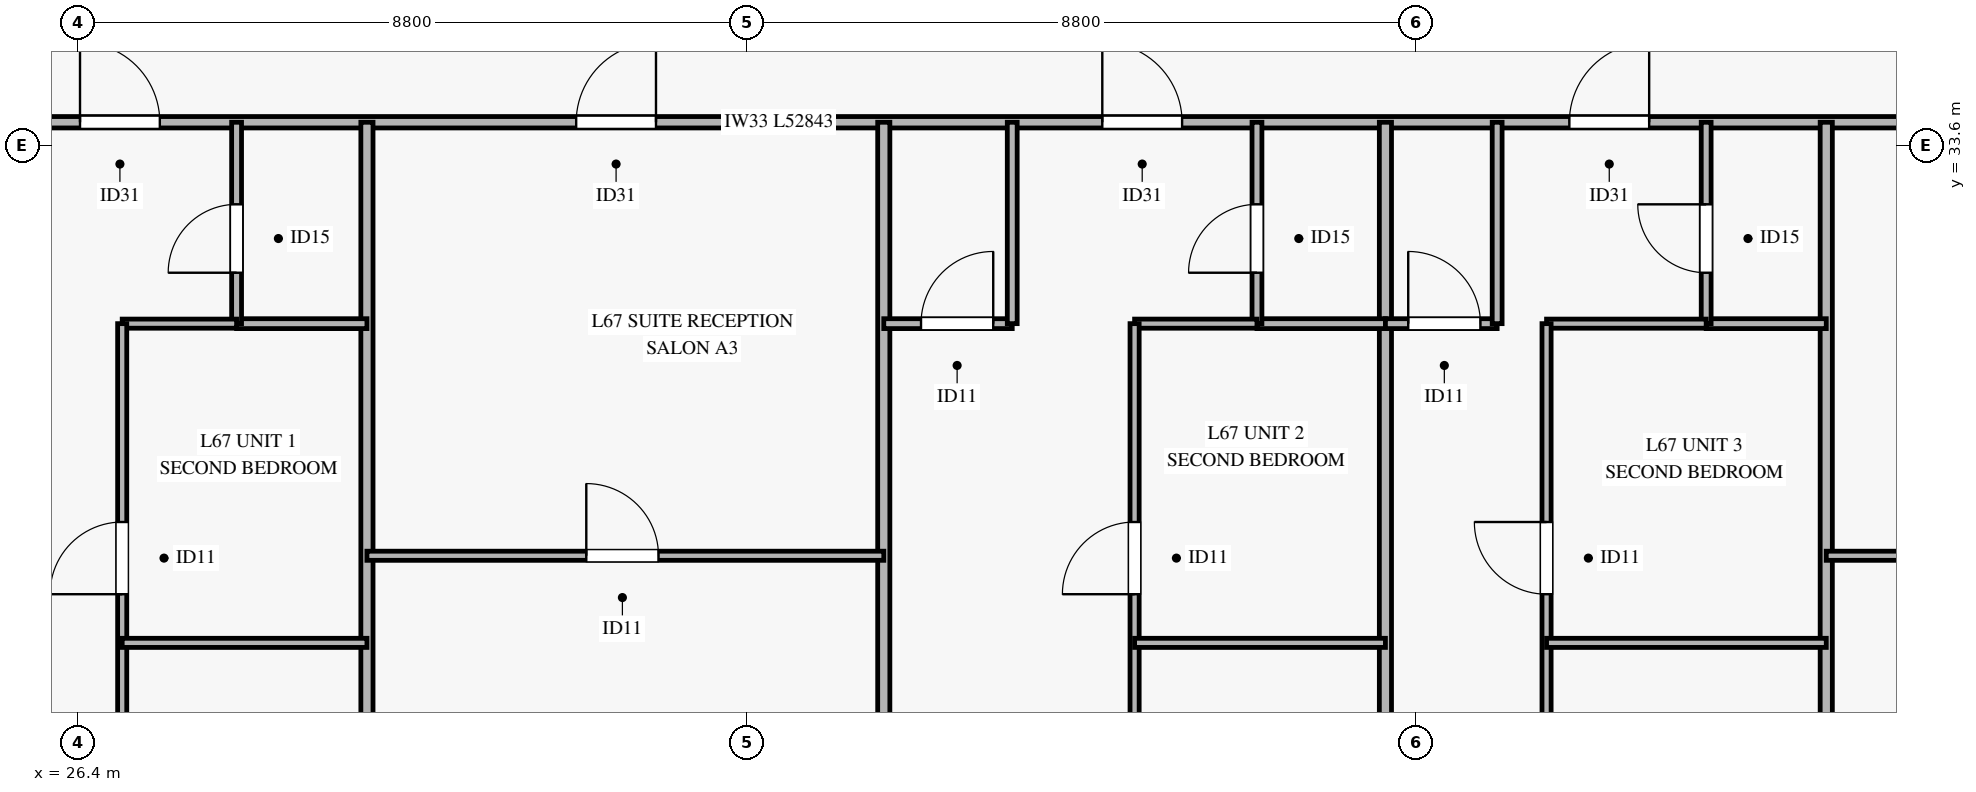
"""IFC4 building model, lengths in metres.
Left out: names, types, materials, properties, quantities, classifications, styles, units other than length and angle.
Written with IfcOpenShell. Run it as: python <this file> out.ifc"""

import sys

from ifc_helpers import new_model, si_unit, direction, frame, frame_2d, origin, place, context, subcontext, project, spatial, rectangle, extrude, source, transform, mapped, element, fill, save


model = new_model("IFC4")
c1 = context("Model", 3, precision=1e-05, world=origin(), true_north=direction((0.0, 1.0)))
c2 = subcontext(c1, "Body", "Model", "MODEL_VIEW")
j1 = project(units=[si_unit("LENGTHUNIT", "METRE"), si_unit("PLANEANGLEUNIT", "RADIAN")], contexts=[c1])
p1 = place(None, origin())
s1 = spatial("IfcSite", under=j1, at=p1, CompositionType="ELEMENT")
p2 = place(p1, origin())
s2 = spatial("IfcBuilding", under=s1, at=p2, CompositionType="ELEMENT")
p3 = place(p2, frame((0.0, 0.0, 262.1)))
s3 = spatial("IfcBuildingStorey", under=s2, at=p3, CompositionType="ELEMENT", Elevation=262.1)
p4 = place(p3, frame((8.779, 33.9, 0.0), z_axis=(0.0, 0.0, 1.0), x_axis=(1.0, 0.0, 0.0)))
e1 = element("IfcWall", 1, at=p4, inside=s3, PredefinedType="PARTITIONING", context=c2, shape_type="SweptSolid", body=[
    extrude(rectangle(XDim=52.843, YDim=0.15, at=frame_2d((26.421, 0.0))), origin(), (0.0, 0.0, 1.0), 2.47),
])
p5 = place(p4, frame((5.887, 0.0, 0.0)))
e2 = element("IfcOpeningElement", 2, at=p5, cuts=e1, PredefinedType="OPENING", context=c2, shape_type="SweptSolid", body=[
    extrude(rectangle(XDim=1.05, YDim=2.15, at=frame_2d((0.525, 1.075))), frame((0.0, 0.085, 0.0), z_axis=(0.0, -1.0, 0.0), x_axis=(1.0, 0.0, 0.0)), (0.0, 0.0, 1.0), 0.17),
])
p6 = place(p4, frame((17.646, 0.0, 0.0)))
e3 = element("IfcOpeningElement", 3, at=p6, cuts=e1, PredefinedType="OPENING", context=c2, shape_type="SweptSolid", body=[
    extrude(rectangle(XDim=1.05, YDim=2.15, at=frame_2d((0.525, 1.075))), frame((0.0, 0.085, 0.0), z_axis=(0.0, -1.0, 0.0), x_axis=(1.0, 0.0, 0.0)), (0.0, 0.0, 1.0), 0.17),
])
p7 = place(p4, frame((24.174, 0.0, 0.0)))
e4 = element("IfcOpeningElement", 4, at=p7, cuts=e1, PredefinedType="OPENING", context=c2, shape_type="SweptSolid", body=[
    extrude(rectangle(XDim=1.05, YDim=2.15, at=frame_2d((0.525, 1.075))), frame((0.0, 0.085, 0.0), z_axis=(0.0, -1.0, 0.0), x_axis=(1.0, 0.0, 0.0)), (0.0, 0.0, 1.0), 0.17),
])
p8 = place(p4, frame((31.096, 0.0, 0.0)))
e5 = element("IfcOpeningElement", 5, at=p8, cuts=e1, PredefinedType="OPENING", context=c2, shape_type="SweptSolid", body=[
    extrude(rectangle(XDim=1.05, YDim=2.15, at=frame_2d((0.525, 1.075))), frame((0.0, 0.085, 0.0), z_axis=(0.0, -1.0, 0.0), x_axis=(1.0, 0.0, 0.0)), (0.0, 0.0, 1.0), 0.17),
])
p9 = place(p4, frame((37.241, 0.0, 0.0)))
e6 = element("IfcOpeningElement", 6, at=p9, cuts=e1, PredefinedType="OPENING", context=c2, shape_type="SweptSolid", body=[
    extrude(rectangle(XDim=1.05, YDim=2.15, at=frame_2d((0.525, 1.075))), frame((0.0, 0.085, 0.0), z_axis=(0.0, -1.0, 0.0), x_axis=(1.0, 0.0, 0.0)), (0.0, 0.0, 1.0), 0.17),
])
p10 = place(p4, frame((45.359, 0.0, 0.0)))
e7 = element("IfcOpeningElement", 7, at=p10, cuts=e1, PredefinedType="OPENING", context=c2, shape_type="SweptSolid", body=[
    extrude(rectangle(XDim=1.05, YDim=2.15, at=frame_2d((0.525, 1.075))), frame((0.0, 0.085, 0.0), z_axis=(0.0, -1.0, 0.0), x_axis=(1.0, 0.0, 0.0)), (0.0, 0.0, 1.0), 0.17),
])
for number, where, z_axis, x_axis in (
    (8, (30.2, 16.045, 0.0), (0.0, 0.0, 1.0), (0.0, 1.0, 0.0)),
    (9, (37.0, 16.045, 0.0), (0.0, 0.0, 1.0), (0.0, 1.0, 0.0)),
    (10, (43.6, 16.045, 0.0), (0.0, 0.0, 1.0), (0.0, 1.0, 0.0)),
    (11, (49.4, 16.045, 0.0), (0.0, 0.0, 1.0), (0.0, 1.0, 0.0)),
):
    element("IfcWall", number, at=place(p3, frame(where, z_axis=z_axis, x_axis=x_axis)), inside=s3, PredefinedType="PARTITIONING", context=c2, shape_type="SweptSolid", body=[
        extrude(rectangle(XDim=17.855, YDim=0.16, at=frame_2d((8.927, 0.0))), origin(), (0.0, 0.0, 1.0), 2.77),
    ])
p11 = place(p3, frame((28.485, 31.25, 0.0), z_axis=(0.0, 0.0, 1.0), x_axis=(1.0, 0.0, 0.0)))
e12 = element("IfcWall", 12, at=p11, inside=s3, PredefinedType="PARTITIONING", context=c2, shape_type="SweptSolid", body=[
    extrude(rectangle(XDim=1.715, YDim=0.13, at=frame_2d((0.857, 0.0))), origin(), (0.0, 0.0, 1.0), 3.185),
])
p12 = place(p3, frame((28.485, 31.25, 0.0), z_axis=(0.0, 0.0, 1.0), x_axis=(0.0, 1.0, 0.0)))
e13 = element("IfcWall", 13, at=p12, inside=s3, PredefinedType="PARTITIONING", context=c2, shape_type="SweptSolid", body=[
    extrude(rectangle(XDim=2.65, YDim=0.13, at=frame_2d((1.325, 0.0))), origin(), (0.0, 0.0, 1.0), 2.77),
])
p13 = place(p12, frame((0.67, 0.0, 0.0)))
e14 = element("IfcOpeningElement", 14, at=p13, cuts=e13, PredefinedType="OPENING", context=c2, shape_type="SweptSolid", body=[
    extrude(rectangle(XDim=0.9, YDim=2.1, at=frame_2d((0.45, 1.05))), frame((0.0, 0.075, 0.0), z_axis=(0.0, -1.0, 0.0), x_axis=(1.0, 0.0, 0.0)), (0.0, 0.0, 1.0), 0.15),
])
p14 = place(p3, frame((26.98, 31.25, 0.0), z_axis=(0.0, 0.0, 1.0), x_axis=(1.0, 0.0, 0.0)))
e15 = element("IfcWall", 15, at=p14, inside=s3, PredefinedType="PARTITIONING", context=c2, shape_type="SweptSolid", body=[
    extrude(rectangle(XDim=1.505, YDim=0.12, at=frame_2d((0.752, 0.0))), origin(), (0.0, 0.0, 1.0), 3.185),
])
p15 = place(p3, frame((26.98, 16.045, 0.0), z_axis=(0.0, 0.0, 1.0), x_axis=(0.0, 1.0, 0.0)))
e16 = element("IfcWall", 16, at=p15, inside=s3, PredefinedType="PARTITIONING", context=c2, shape_type="SweptSolid", body=[
    extrude(rectangle(XDim=15.205, YDim=0.12, at=frame_2d((7.603, 0.0))), origin(), (0.0, 0.0, 1.0), 2.77),
])
p16 = place(p15, frame((0.67, 0.0, 0.0)))
e17 = element("IfcOpeningElement", 17, at=p16, cuts=e16, PredefinedType="OPENING", context=c2, shape_type="SweptSolid", body=[
    extrude(rectangle(XDim=0.95, YDim=2.1, at=frame_2d((0.475, 1.05))), frame((0.0, 0.07, 0.0), z_axis=(0.0, -1.0, 0.0), x_axis=(1.0, 0.0, 0.0)), (0.0, 0.0, 1.0), 0.14),
])
p17 = place(p15, frame((11.645, 0.0, 0.0)))
e18 = element("IfcOpeningElement", 18, at=p17, cuts=e16, PredefinedType="OPENING", context=c2, shape_type="SweptSolid", body=[
    extrude(rectangle(XDim=0.95, YDim=2.1, at=frame_2d((0.475, 1.05))), frame((0.0, 0.07, 0.0), z_axis=(0.0, -1.0, 0.0), x_axis=(1.0, 0.0, 0.0)), (0.0, 0.0, 1.0), 0.14),
])
p18 = place(p3, frame((26.98, 27.05, 0.0), z_axis=(0.0, 0.0, 1.0), x_axis=(1.0, 0.0, 0.0)))
e19 = element("IfcWall", 19, at=p18, inside=s3, PredefinedType="PARTITIONING", context=c2, shape_type="SweptSolid", body=[
    extrude(rectangle(XDim=3.22, YDim=0.12, at=frame_2d((1.61, 0.0))), origin(), (0.0, 0.0, 1.0), 3.185),
])
p19 = place(p3, frame((30.2, 28.196, 0.0), z_axis=(0.0, 0.0, 1.0), x_axis=(1.0, 0.0, 0.0)))
e20 = element("IfcWall", 20, at=p19, inside=s3, PredefinedType="PARTITIONING", context=c2, shape_type="SweptSolid", body=[
    extrude(rectangle(XDim=6.8, YDim=0.12, at=frame_2d((3.4, 0.0))), origin(), (0.0, 0.0, 1.0), 2.47),
])
p20 = place(p19, frame((2.886, 0.0, 0.0)))
e21 = element("IfcOpeningElement", 21, at=p20, cuts=e20, PredefinedType="OPENING", context=c2, shape_type="SweptSolid", body=[
    extrude(rectangle(XDim=0.95, YDim=2.1, at=frame_2d((0.475, 1.05))), frame((0.0, 0.07, 0.0), z_axis=(0.0, -1.0, 0.0), x_axis=(1.0, 0.0, 0.0)), (0.0, 0.0, 1.0), 0.14),
])
p21 = place(p3, frame((37.0, 31.25, 0.0), z_axis=(0.0, 0.0, 1.0), x_axis=(1.0, 0.0, 0.0)))
e22 = element("IfcWall", 22, at=p21, inside=s3, PredefinedType="PARTITIONING", context=c2, shape_type="SweptSolid", body=[
    extrude(rectangle(XDim=1.69, YDim=0.13, at=frame_2d((0.845, 0.0))), origin(), (0.0, 0.0, 1.0), 2.47),
])
p22 = place(p21, frame((0.49, 0.0, 0.0)))
e23 = element("IfcOpeningElement", 23, at=p22, cuts=e22, PredefinedType="OPENING", context=c2, shape_type="SweptSolid", body=[
    extrude(rectangle(XDim=0.95, YDim=2.1, at=frame_2d((0.475, 1.05))), frame((0.0, 0.075, 0.0), z_axis=(0.0, -1.0, 0.0), x_axis=(1.0, 0.0, 0.0)), (0.0, 0.0, 1.0), 0.15),
])
p23 = place(p3, frame((38.69, 31.25, 0.0), z_axis=(0.0, 0.0, 1.0), x_axis=(0.0, 1.0, 0.0)))
e24 = element("IfcWall", 24, at=p23, inside=s3, PredefinedType="PARTITIONING", context=c2, shape_type="SweptSolid", body=[
    extrude(rectangle(XDim=2.65, YDim=0.13, at=frame_2d((1.325, 0.0))), origin(), (0.0, 0.0, 1.0), 2.77),
])
p24 = place(p3, frame((41.91, 31.25, 0.0), z_axis=(0.0, 0.0, 1.0), x_axis=(1.0, 0.0, 0.0)))
e25 = element("IfcWall", 25, at=p24, inside=s3, PredefinedType="PARTITIONING", context=c2, shape_type="SweptSolid", body=[
    extrude(rectangle(XDim=1.69, YDim=0.13, at=frame_2d((0.845, 0.0))), origin(), (0.0, 0.0, 1.0), 3.185),
])
p25 = place(p3, frame((41.91, 31.25, 0.0), z_axis=(0.0, 0.0, 1.0), x_axis=(0.0, 1.0, 0.0)))
e26 = element("IfcWall", 26, at=p25, inside=s3, PredefinedType="PARTITIONING", context=c2, shape_type="SweptSolid", body=[
    extrude(rectangle(XDim=2.65, YDim=0.13, at=frame_2d((1.325, 0.0))), origin(), (0.0, 0.0, 1.0), 2.77),
])
p26 = place(p25, frame((0.67, 0.0, 0.0)))
e27 = element("IfcOpeningElement", 27, at=p26, cuts=e26, PredefinedType="OPENING", context=c2, shape_type="SweptSolid", body=[
    extrude(rectangle(XDim=0.9, YDim=2.1, at=frame_2d((0.45, 1.05))), frame((0.0, 0.075, 0.0), z_axis=(0.0, -1.0, 0.0), x_axis=(1.0, 0.0, 0.0)), (0.0, 0.0, 1.0), 0.15),
])
p27 = place(p3, frame((40.3, 31.25, 0.0), z_axis=(0.0, 0.0, 1.0), x_axis=(1.0, 0.0, 0.0)))
e28 = element("IfcWall", 28, at=p27, inside=s3, PredefinedType="PARTITIONING", context=c2, shape_type="SweptSolid", body=[
    extrude(rectangle(XDim=1.61, YDim=0.12, at=frame_2d((0.805, 0.0))), origin(), (0.0, 0.0, 1.0), 3.185),
])
p28 = place(p3, frame((40.3, 16.045, 0.0), z_axis=(0.0, 0.0, 1.0), x_axis=(0.0, 1.0, 0.0)))
e29 = element("IfcWall", 29, at=p28, inside=s3, PredefinedType="PARTITIONING", context=c2, shape_type="SweptSolid", body=[
    extrude(rectangle(XDim=15.205, YDim=0.12, at=frame_2d((7.603, 0.0))), origin(), (0.0, 0.0, 1.0), 2.77),
])
p29 = place(p28, frame((1.59, 0.0, 0.0)))
e30 = element("IfcOpeningElement", 30, at=p29, cuts=e29, PredefinedType="OPENING", context=c2, shape_type="SweptSolid", body=[
    extrude(rectangle(XDim=0.95, YDim=2.1, at=frame_2d((0.475, 1.05))), frame((0.0, 0.07, 0.0), z_axis=(0.0, -1.0, 0.0), x_axis=(1.0, 0.0, 0.0)), (0.0, 0.0, 1.0), 0.14),
])
p30 = place(p28, frame((11.645, 0.0, 0.0)))
e31 = element("IfcOpeningElement", 31, at=p30, cuts=e29, PredefinedType="OPENING", context=c2, shape_type="SweptSolid", body=[
    extrude(rectangle(XDim=0.95, YDim=2.1, at=frame_2d((0.475, 1.05))), frame((0.0, 0.07, 0.0), z_axis=(0.0, -1.0, 0.0), x_axis=(1.0, 0.0, 0.0)), (0.0, 0.0, 1.0), 0.14),
])
p31 = place(p3, frame((40.3, 27.05, 0.0), z_axis=(0.0, 0.0, 1.0), x_axis=(1.0, 0.0, 0.0)))
e32 = element("IfcWall", 32, at=p31, inside=s3, PredefinedType="PARTITIONING", context=c2, shape_type="SweptSolid", body=[
    extrude(rectangle(XDim=3.3, YDim=0.12, at=frame_2d((1.65, 0.0))), origin(), (0.0, 0.0, 1.0), 3.185),
])
p32 = place(p3, frame((43.6, 31.25, 0.0), z_axis=(0.0, 0.0, 1.0), x_axis=(1.0, 0.0, 0.0)))
e33 = element("IfcWall", 33, at=p32, inside=s3, PredefinedType="PARTITIONING", context=c2, shape_type="SweptSolid", body=[
    extrude(rectangle(XDim=1.47, YDim=0.13, at=frame_2d((0.735, 0.0))), origin(), (0.0, 0.0, 1.0), 2.47),
])
p33 = place(p32, frame((0.3, 0.0, 0.0)))
e34 = element("IfcOpeningElement", 34, at=p33, cuts=e33, PredefinedType="OPENING", context=c2, shape_type="SweptSolid", body=[
    extrude(rectangle(XDim=0.95, YDim=2.1, at=frame_2d((0.475, 1.05))), frame((0.0, 0.075, 0.0), z_axis=(0.0, -1.0, 0.0), x_axis=(1.0, 0.0, 0.0)), (0.0, 0.0, 1.0), 0.15),
])
p34 = place(p3, frame((45.07, 31.25, 0.0), z_axis=(0.0, 0.0, 1.0), x_axis=(0.0, 1.0, 0.0)))
e35 = element("IfcWall", 35, at=p34, inside=s3, PredefinedType="PARTITIONING", context=c2, shape_type="SweptSolid", body=[
    extrude(rectangle(XDim=2.65, YDim=0.13, at=frame_2d((1.325, 0.0))), origin(), (0.0, 0.0, 1.0), 2.77),
])
p35 = place(p3, frame((47.82, 31.25, 0.0), z_axis=(0.0, 0.0, 1.0), x_axis=(1.0, 0.0, 0.0)))
e36 = element("IfcWall", 36, at=p35, inside=s3, PredefinedType="PARTITIONING", context=c2, shape_type="SweptSolid", body=[
    extrude(rectangle(XDim=1.58, YDim=0.13, at=frame_2d((0.79, 0.0))), origin(), (0.0, 0.0, 1.0), 3.185),
])
p36 = place(p3, frame((47.82, 31.25, 0.0), z_axis=(0.0, 0.0, 1.0), x_axis=(0.0, 1.0, 0.0)))
e37 = element("IfcWall", 37, at=p36, inside=s3, PredefinedType="PARTITIONING", context=c2, shape_type="SweptSolid", body=[
    extrude(rectangle(XDim=2.65, YDim=0.13, at=frame_2d((1.325, 0.0))), origin(), (0.0, 0.0, 1.0), 2.77),
])
p37 = place(p36, frame((0.67, 0.0, 0.0)))
e38 = element("IfcOpeningElement", 38, at=p37, cuts=e37, PredefinedType="OPENING", context=c2, shape_type="SweptSolid", body=[
    extrude(rectangle(XDim=0.9, YDim=2.1, at=frame_2d((0.45, 1.05))), frame((0.0, 0.075, 0.0), z_axis=(0.0, -1.0, 0.0), x_axis=(1.0, 0.0, 0.0)), (0.0, 0.0, 1.0), 0.15),
])
p38 = place(p3, frame((45.72, 31.25, 0.0), z_axis=(0.0, 0.0, 1.0), x_axis=(1.0, 0.0, 0.0)))
e39 = element("IfcWall", 39, at=p38, inside=s3, PredefinedType="PARTITIONING", context=c2, shape_type="SweptSolid", body=[
    extrude(rectangle(XDim=2.1, YDim=0.12, at=frame_2d((1.05, 0.0))), origin(), (0.0, 0.0, 1.0), 3.185),
])
p39 = place(p3, frame((45.72, 16.045, 0.0), z_axis=(0.0, 0.0, 1.0), x_axis=(0.0, 1.0, 0.0)))
e40 = element("IfcWall", 40, at=p39, inside=s3, PredefinedType="PARTITIONING", context=c2, shape_type="SweptSolid", body=[
    extrude(rectangle(XDim=15.205, YDim=0.12, at=frame_2d((7.603, 0.0))), origin(), (0.0, 0.0, 1.0), 2.77),
])
p40 = place(p39, frame((0.67, 0.0, 0.0)))
e41 = element("IfcOpeningElement", 41, at=p40, cuts=e40, PredefinedType="OPENING", context=c2, shape_type="SweptSolid", body=[
    extrude(rectangle(XDim=0.95, YDim=2.1, at=frame_2d((0.475, 1.05))), frame((0.0, 0.07, 0.0), z_axis=(0.0, -1.0, 0.0), x_axis=(1.0, 0.0, 0.0)), (0.0, 0.0, 1.0), 0.14),
])
p41 = place(p39, frame((11.645, 0.0, 0.0)))
e42 = element("IfcOpeningElement", 42, at=p41, cuts=e40, PredefinedType="OPENING", context=c2, shape_type="SweptSolid", body=[
    extrude(rectangle(XDim=0.95, YDim=2.1, at=frame_2d((0.475, 1.05))), frame((0.0, 0.07, 0.0), z_axis=(0.0, -1.0, 0.0), x_axis=(1.0, 0.0, 0.0)), (0.0, 0.0, 1.0), 0.14),
])
p42 = place(p3, frame((45.72, 27.05, 0.0), z_axis=(0.0, 0.0, 1.0), x_axis=(1.0, 0.0, 0.0)))
e43 = element("IfcWall", 43, at=p42, inside=s3, PredefinedType="PARTITIONING", context=c2, shape_type="SweptSolid", body=[
    extrude(rectangle(XDim=3.68, YDim=0.12, at=frame_2d((1.84, 0.0))), origin(), (0.0, 0.0, 1.0), 3.185),
])
p43 = place(p3, frame((49.4, 28.196, 0.0), z_axis=(0.0, 0.0, 1.0), x_axis=(1.0, 0.0, 0.0)))
e44 = element("IfcWall", 44, at=p43, inside=s3, PredefinedType="PARTITIONING", context=c2, shape_type="SweptSolid", body=[
    extrude(rectangle(XDim=12.222, YDim=0.12, at=frame_2d((6.111, 0.0))), origin(), (0.0, 0.0, 1.0), 2.47),
])
p44 = place(p43, frame((4.975, 0.0, 0.0)))
e45 = element("IfcOpeningElement", 45, at=p44, cuts=e44, PredefinedType="OPENING", context=c2, shape_type="SweptSolid", body=[
    extrude(rectangle(XDim=0.95, YDim=2.1, at=frame_2d((0.475, 1.05))), frame((0.0, 0.07, 0.0), z_axis=(0.0, -1.0, 0.0), x_axis=(1.0, 0.0, 0.0)), (0.0, 0.0, 1.0), 0.14),
])
m1 = source(origin(), c2, "Body", "SweptSolid", [
    extrude(rectangle(XDim=1.05, YDim=2.15, at=frame_2d((0.525, 1.075))), frame((0.0, 0.025, 0.0), z_axis=(0.0, -1.0, 0.0), x_axis=(1.0, 0.0, 0.0)), (0.0, 0.0, 1.0), 0.05),
])
p45 = place(p6, origin())
e46 = element("IfcDoor", 46, at=p45, inside=s3, OperationType="SINGLE_SWING_LEFT", PredefinedType="DOOR", context=c2, shape_type="MappedRepresentation", body=[
    mapped(m1, transform((0.0, 0.0, 0.0), x_axis=(1.0, 0.0, 0.0), y_axis=(0.0, 1.0, 0.0), z_axis=(0.0, 0.0, 1.0), scale=1.0)),
])
fill(e3, e46)
m2 = source(origin(), c2, "Body", "SweptSolid", [
    extrude(rectangle(XDim=0.9, YDim=2.1, at=frame_2d((0.45, 1.05))), frame((0.0, 0.025, 0.0), z_axis=(0.0, -1.0, 0.0), x_axis=(1.0, 0.0, 0.0)), (0.0, 0.0, 1.0), 0.05),
])
p46 = place(p13, origin())
e47 = element("IfcDoor", 47, at=p46, inside=s3, OperationType="SINGLE_SWING_LEFT", PredefinedType="DOOR", context=c2, shape_type="MappedRepresentation", body=[
    mapped(m2, transform((0.0, 0.0, 0.0), x_axis=(1.0, 0.0, 0.0), y_axis=(0.0, 1.0, 0.0), z_axis=(0.0, 0.0, 1.0), scale=1.0)),
])
fill(e14, e47)
m3 = source(origin(), c2, "Body", "SweptSolid", [
    extrude(rectangle(XDim=0.95, YDim=2.1, at=frame_2d((0.475, 1.05))), frame((0.0, 0.025, 0.0), z_axis=(0.0, -1.0, 0.0), x_axis=(1.0, 0.0, 0.0)), (0.0, 0.0, 1.0), 0.05),
])
p47 = place(p17, origin())
e48 = element("IfcDoor", 48, at=p47, inside=s3, OperationType="SINGLE_SWING_LEFT", PredefinedType="DOOR", context=c2, shape_type="MappedRepresentation", body=[
    mapped(m3, transform((0.0, 0.0, 0.0), x_axis=(1.0, 0.0, 0.0), y_axis=(0.0, 1.0, 0.0), z_axis=(0.0, 0.0, 1.0), scale=1.0)),
])
fill(e18, e48)
p48 = place(p7, origin())
e49 = element("IfcDoor", 49, at=p48, inside=s3, OperationType="SINGLE_SWING_RIGHT", PredefinedType="DOOR", context=c2, shape_type="MappedRepresentation", body=[
    mapped(m1, transform((0.0, 0.0, 0.0), x_axis=(1.0, 0.0, 0.0), y_axis=(0.0, 1.0, 0.0), z_axis=(0.0, 0.0, 1.0), scale=1.0)),
])
fill(e4, e49)
p49 = place(p20, origin())
e50 = element("IfcDoor", 50, at=p49, inside=s3, OperationType="SINGLE_SWING_LEFT", PredefinedType="DOOR", context=c2, shape_type="MappedRepresentation", body=[
    mapped(m3, transform((0.0, 0.0, 0.0), x_axis=(1.0, 0.0, 0.0), y_axis=(0.0, 1.0, 0.0), z_axis=(0.0, 0.0, 1.0), scale=1.0)),
])
fill(e21, e50)
p50 = place(p8, origin())
e51 = element("IfcDoor", 51, at=p50, inside=s3, OperationType="SINGLE_SWING_LEFT", PredefinedType="DOOR", context=c2, shape_type="MappedRepresentation", body=[
    mapped(m1, transform((0.0, 0.0, 0.0), x_axis=(1.0, 0.0, 0.0), y_axis=(0.0, 1.0, 0.0), z_axis=(0.0, 0.0, 1.0), scale=1.0)),
])
fill(e5, e51)
p51 = place(p22, origin())
e52 = element("IfcDoor", 52, at=p51, inside=s3, OperationType="SINGLE_SWING_RIGHT", PredefinedType="DOOR", context=c2, shape_type="MappedRepresentation", body=[
    mapped(m3, transform((0.0, 0.0, 0.0), x_axis=(1.0, 0.0, 0.0), y_axis=(0.0, 1.0, 0.0), z_axis=(0.0, 0.0, 1.0), scale=1.0)),
])
fill(e23, e52)
p52 = place(p26, origin())
e53 = element("IfcDoor", 53, at=p52, inside=s3, OperationType="SINGLE_SWING_LEFT", PredefinedType="DOOR", context=c2, shape_type="MappedRepresentation", body=[
    mapped(m2, transform((0.0, 0.0, 0.0), x_axis=(1.0, 0.0, 0.0), y_axis=(0.0, 1.0, 0.0), z_axis=(0.0, 0.0, 1.0), scale=1.0)),
])
fill(e27, e53)
p53 = place(p30, origin())
e54 = element("IfcDoor", 54, at=p53, inside=s3, OperationType="SINGLE_SWING_LEFT", PredefinedType="DOOR", context=c2, shape_type="MappedRepresentation", body=[
    mapped(m3, transform((0.0, 0.0, 0.0), x_axis=(1.0, 0.0, 0.0), y_axis=(0.0, 1.0, 0.0), z_axis=(0.0, 0.0, 1.0), scale=1.0)),
])
fill(e31, e54)
p54 = place(p9, origin())
e55 = element("IfcDoor", 55, at=p54, inside=s3, OperationType="SINGLE_SWING_RIGHT", PredefinedType="DOOR", context=c2, shape_type="MappedRepresentation", body=[
    mapped(m1, transform((0.0, 0.0, 0.0), x_axis=(1.0, 0.0, 0.0), y_axis=(0.0, 1.0, 0.0), z_axis=(0.0, 0.0, 1.0), scale=1.0)),
])
fill(e6, e55)
p55 = place(p33, origin())
e56 = element("IfcDoor", 56, at=p55, inside=s3, OperationType="SINGLE_SWING_LEFT", PredefinedType="DOOR", context=c2, shape_type="MappedRepresentation", body=[
    mapped(m3, transform((0.0, 0.0, 0.0), x_axis=(1.0, 0.0, 0.0), y_axis=(0.0, 1.0, 0.0), z_axis=(0.0, 0.0, 1.0), scale=1.0)),
])
fill(e34, e56)
p56 = place(p37, origin())
e57 = element("IfcDoor", 57, at=p56, inside=s3, OperationType="SINGLE_SWING_RIGHT", PredefinedType="DOOR", context=c2, shape_type="MappedRepresentation", body=[
    mapped(m2, transform((0.0, 0.0, 0.0), x_axis=(1.0, 0.0, 0.0), y_axis=(0.0, 1.0, 0.0), z_axis=(0.0, 0.0, 1.0), scale=1.0)),
])
fill(e38, e57)
p57 = place(p41, origin())
e58 = element("IfcDoor", 58, at=p57, inside=s3, OperationType="SINGLE_SWING_RIGHT", PredefinedType="DOOR", context=c2, shape_type="MappedRepresentation", body=[
    mapped(m3, transform((0.0, 0.0, 0.0), x_axis=(1.0, 0.0, 0.0), y_axis=(0.0, 1.0, 0.0), z_axis=(0.0, 0.0, 1.0), scale=1.0)),
])
fill(e42, e58)
save(model, sys.argv[1])
